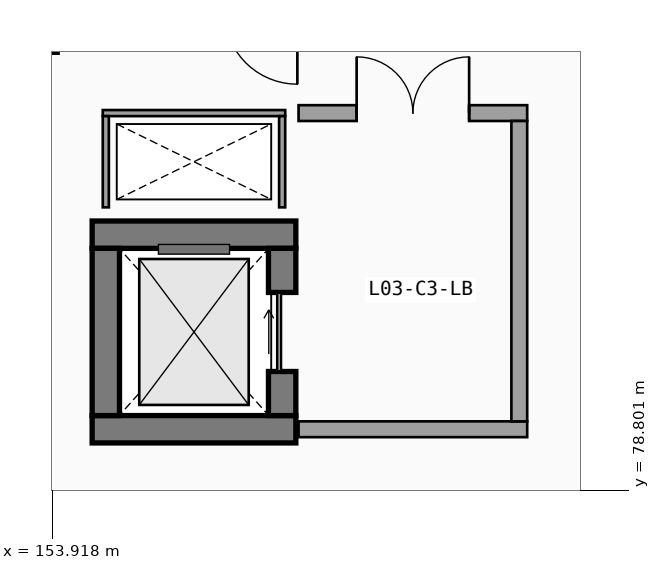
"""IFC4 building model, lengths in metres.
Left out: names, types, materials, properties, quantities, classifications, styles, units other than length and angle.
Written with IfcOpenShell. Run it as: python <this file> out.ifc"""

import sys

from ifc_helpers import new_model, si_unit, direction, frame, frame_2d, origin, origin_2d, place, context, subcontext, project, spatial, rectangle, extrude, element, fill, save


model = new_model("IFC4")
c1 = context("Model", 3, precision=1e-05, world=origin(), true_north=direction((0.0, 1.0)))
c2 = subcontext(c1, "Body", "Model", "MODEL_VIEW")
j1 = project(units=[si_unit("LENGTHUNIT", "METRE"), si_unit("PLANEANGLEUNIT", "RADIAN")], contexts=[c1])
p1 = place(None, origin())
s1 = spatial("IfcSite", under=j1, at=p1, CompositionType="ELEMENT")
p2 = place(p1, origin())
s2 = spatial("IfcBuilding", under=s1, at=p2, CompositionType="ELEMENT")
p3 = place(p2, frame((0.0, 0.0, 14.1)))
s3 = spatial("IfcBuildingStorey", under=s2, at=p3, CompositionType="ELEMENT", Elevation=14.1)
p4 = place(p3, frame((153.6, 86.4, 0.0), z_axis=(0.0, 0.0, 1.0), x_axis=(1.0, 0.0, 0.0)))
e1 = element("IfcColumn", 1, at=p4, inside=s3, PredefinedType="COLUMN", context=c2, shape_type="SweptSolid", body=[
    extrude(rectangle(XDim=0.8, YDim=0.8, at=origin_2d()), origin(), (0.0, 0.0, 1.0), 4.5),
])
for number, where, z_axis, x_axis in (
    (2, (154.575, 79.8, 0.0), (0.0, 0.0, 1.0), (1.0, 0.0, 0.0)),
    (3, (157.925, 83.0, 0.0), (0.0, 0.0, 1.0), (-1.0, 0.0, 0.0)),
):
    element("IfcWall", number, at=place(p3, frame(where, z_axis=z_axis, x_axis=x_axis)), inside=s3, PredefinedType="SHEAR", context=c2, shape_type="SweptSolid", body=[
        extrude(rectangle(XDim=3.35, YDim=0.45, at=frame_2d((1.675, 0.0))), origin(), (0.0, 0.0, 1.0), 4.24),
    ])
p5 = place(p3, frame((154.8, 82.775, 0.0), z_axis=(0.0, 0.0, 1.0), x_axis=(0.0, -1.0, 0.0)))
e4 = element("IfcWall", 4, at=p5, inside=s3, PredefinedType="SHEAR", context=c2, shape_type="SweptSolid", body=[
    extrude(rectangle(XDim=2.75, YDim=0.45, at=frame_2d((1.375, 0.0))), origin(), (0.0, 0.0, 1.0), 4.24),
])
p6 = place(p3, frame((157.7, 80.025, 0.0), z_axis=(0.0, 0.0, 1.0), x_axis=(0.0, 1.0, 0.0)))
e5 = element("IfcWall", 5, at=p6, inside=s3, PredefinedType="SHEAR", context=c2, shape_type="SweptSolid", body=[
    extrude(rectangle(XDim=2.75, YDim=0.45, at=frame_2d((1.375, 0.0))), origin(), (0.0, 0.0, 1.0), 4.24),
])
p7 = place(p6, frame((0.725, 0.0, 0.0), z_axis=(0.0, 0.0, 1.0), x_axis=(1.0, 0.0, 0.0)))
e6 = element("IfcOpeningElement", 6, at=p7, cuts=e5, PredefinedType="OPENING", context=c2, shape_type="SweptSolid", body=[
    extrude(rectangle(XDim=1.3, YDim=2.25, at=frame_2d((0.65, 1.125))), frame((0.0, 0.235, 0.0), z_axis=(0.0, -1.0, 0.0), x_axis=(1.0, 0.0, 0.0)), (0.0, 0.0, 1.0), 0.47),
])
p8 = place(p3, frame((157.75, 85.0, 0.0), z_axis=(0.0, 0.0, 1.0), x_axis=(-1.0, 0.0, 0.0)))
e7 = element("IfcWall", 7, at=p8, inside=s3, PredefinedType="PARTITIONING", context=c2, shape_type="SweptSolid", body=[
    extrude(rectangle(XDim=3.0, YDim=0.1, at=frame_2d((1.5, 0.0))), origin(), (0.0, 0.0, 1.0), 4.24),
])
for number, where, z_axis, x_axis in (
    (8, (154.8, 84.95, 0.0), (0.0, 0.0, 1.0), (0.0, -1.0, 0.0)),
    (9, (157.7, 83.45, 0.0), (0.0, 0.0, 1.0), (0.0, 1.0, 0.0)),
):
    element("IfcWall", number, at=place(p3, frame(where, z_axis=z_axis, x_axis=x_axis)), inside=s3, PredefinedType="PARTITIONING", context=c2, shape_type="SweptSolid", body=[
        extrude(rectangle(XDim=1.5, YDim=0.1, at=frame_2d((0.75, 0.0))), origin(), (0.0, 0.0, 1.0), 4.24),
    ])
p9 = place(p3, frame((157.97, 79.8, 0.0), z_axis=(0.0, 0.0, 1.0), x_axis=(1.0, 0.0, 0.0)))
e10 = element("IfcWall", 10, at=p9, inside=s3, PredefinedType="SOLIDWALL", context=c2, shape_type="SweptSolid", body=[
    extrude(rectangle(XDim=3.76, YDim=0.26, at=frame_2d((1.88, 0.0))), origin(), (0.0, 0.0, 1.0), 4.24),
])
p10 = place(p3, frame((161.73, 85.0, 0.0), z_axis=(0.0, 0.0, 1.0), x_axis=(-1.0, 0.0, 0.0)))
e11 = element("IfcWall", 11, at=p10, inside=s3, PredefinedType="SOLIDWALL", context=c2, shape_type="SweptSolid", body=[
    extrude(rectangle(XDim=3.76, YDim=0.26, at=frame_2d((1.88, 0.0))), origin(), (0.0, 0.0, 1.0), 4.24),
])
p11 = place(p10, frame((2.805, 0.0, 0.0), z_axis=(0.0, 0.0, 1.0), x_axis=(-1.0, 0.0, 0.0)))
e12 = element("IfcOpeningElement", 12, at=p11, cuts=e11, PredefinedType="OPENING", context=c2, shape_type="SweptSolid", body=[
    extrude(rectangle(XDim=1.85, YDim=2.25, at=frame_2d((0.925, 1.125))), frame((0.0, 0.14, 0.0), z_axis=(0.0, -1.0, 0.0), x_axis=(1.0, 0.0, 0.0)), (0.0, 0.0, 1.0), 0.28),
])
p12 = place(p3, frame((161.6, 79.93, 0.0), z_axis=(0.0, 0.0, 1.0), x_axis=(0.0, 1.0, 0.0)))
e13 = element("IfcWall", 13, at=p12, inside=s3, PredefinedType="SOLIDWALL", context=c2, shape_type="SweptSolid", body=[
    extrude(rectangle(XDim=4.94, YDim=0.26, at=frame_2d((2.47, 0.0))), origin(), (0.0, 0.0, 1.0), 4.24),
])
p13 = place(p7, origin())
e14 = element("IfcDoor", 14, at=p13, inside=s3, OperationType="SLIDING_TO_RIGHT", PredefinedType="DOOR", context=c2, shape_type="SweptSolid", body=[
    extrude(rectangle(XDim=1.3, YDim=2.25, at=frame_2d((0.65, 1.125))), frame((0.0, 0.025, 0.0), z_axis=(0.0, -1.0, 0.0), x_axis=(1.0, 0.0, 0.0)), (0.0, 0.0, 1.0), 0.05),
])
fill(e6, e14)
p14 = place(p11, origin())
e15 = element("IfcDoor", 15, at=p14, inside=s3, OperationType="DOUBLE_DOOR_SINGLE_SWING", PredefinedType="DOOR", context=c2, shape_type="SweptSolid", body=[
    extrude(rectangle(XDim=1.85, YDim=2.25, at=frame_2d((0.925, 1.125))), frame((0.0, 0.025, 0.0), z_axis=(0.0, -1.0, 0.0), x_axis=(1.0, 0.0, 0.0)), (0.0, 0.0, 1.0), 0.05),
])
fill(e12, e15)
save(model, sys.argv[1])
